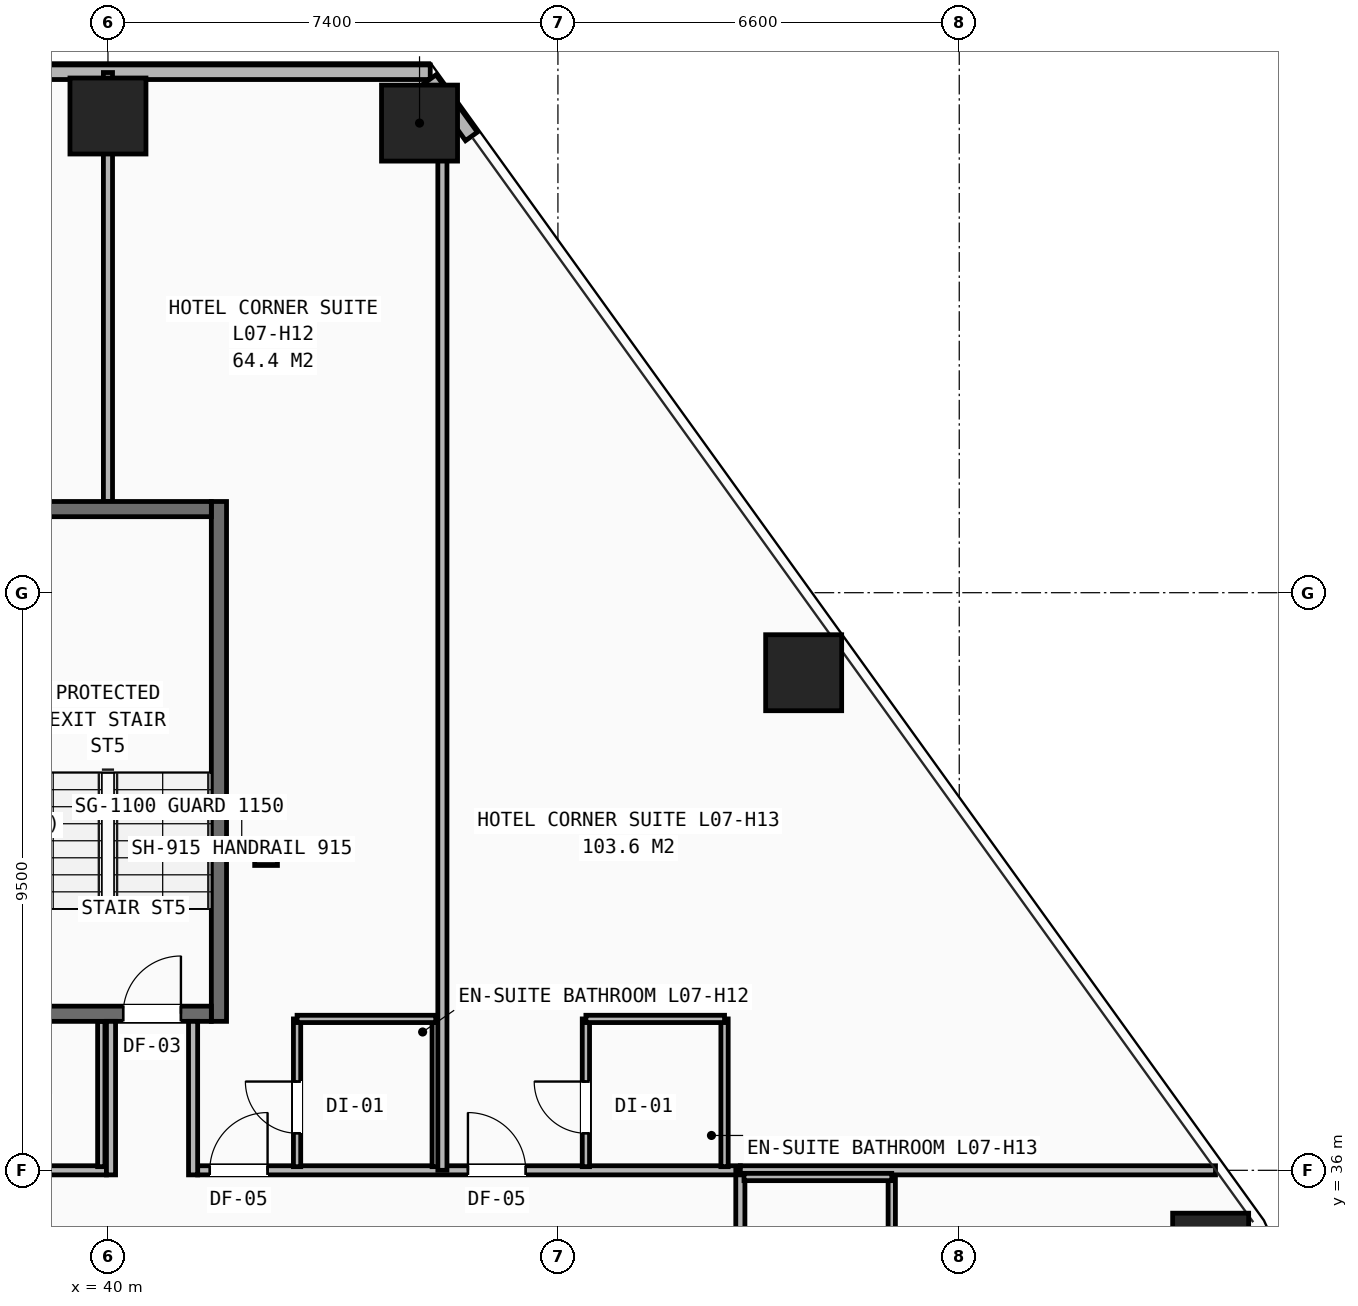
"""IFC4 building model, lengths in metres.
Left out: names, types, materials, properties, quantities, classifications, styles, units other than length and angle.
Written with IfcOpenShell. Run it as: python <this file> out.ifc"""

import sys

from ifc_helpers import new_model, si_unit, direction, frame, frame_2d, origin, origin_2d, place, context, subcontext, project, spatial, rectangle, hollow_rectangle, i_section, extrude, element, fill, save


model = new_model("IFC4")
c1 = context("Model", 3, precision=1e-05, world=origin(), true_north=direction((0.0, 1.0)))
c2 = subcontext(c1, "Body", "Model", "MODEL_VIEW")
j1 = project(units=[si_unit("LENGTHUNIT", "METRE"), si_unit("PLANEANGLEUNIT", "RADIAN")], contexts=[c1])
p1 = place(None, origin())
s1 = spatial("IfcSite", under=j1, at=p1, CompositionType="ELEMENT")
p2 = place(p1, origin())
s2 = spatial("IfcBuilding", under=s1, at=p2, CompositionType="ELEMENT")
p3 = place(p2, frame((0.0, 0.0, 30.4)))
s3 = spatial("IfcBuildingStorey", under=s2, at=p3, CompositionType="ELEMENT", Elevation=30.4)
p4 = place(p3, frame((42.6, 41.2, 0.0), z_axis=(0.0, 0.0, 1.0), x_axis=(1.0, 0.0, 0.0)))
e1 = element("IfcColumn", 1, at=p4, inside=s3, PredefinedType="COLUMN", context=c2, shape_type="SweptSolid", body=[
    extrude(i_section(OverallWidth=0.374, OverallDepth=0.372, WebThickness=0.016, FlangeThickness=0.026, at=origin_2d()), origin(), (0.0, 0.0, 1.0), 3.2),
])
for number, where, z_axis, x_axis in (
    (2, (45.124, 53.223, 0.0), (0.0, 0.0, 1.0), (1.0, 0.0, 0.0)),
    (3, (40.0, 53.34, 0.0), (0.0, 0.0, 1.0), (1.0, 0.0, 0.0)),
    (4, (58.135, 34.67, 0.0), (0.0, 0.0, 1.0), (1.0, 0.0, 0.0)),
    (5, (51.441, 44.184, 0.0), (0.0, 0.0, 1.0), (1.0, 0.0, 0.0)),
):
    element("IfcColumn", number, at=place(p3, frame(where, z_axis=z_axis, x_axis=x_axis)), inside=s3, PredefinedType="COLUMN", context=c2, shape_type="SweptSolid", body=[
        extrude(hollow_rectangle(XDim=1.25, YDim=1.25, WallThickness=0.08, at=origin_2d()), origin(), (0.0, 0.0, 1.0), 3.2),
    ])
p5 = place(p3, frame((34.7, 54.06, 0.0), z_axis=(0.0, 0.0, 1.0), x_axis=(1.0, 0.0, 0.0)))
e6 = element("IfcWall", 6, at=p5, inside=s3, PredefinedType="SHEAR", context=c2, shape_type="SweptSolid", body=[
    extrude(rectangle(XDim=10.6, YDim=0.24, at=frame_2d((5.3, 0.0))), origin(), (0.0, 0.0, 1.0), 2.263),
])
p6 = place(p3, frame((45.978, 53.005, 0.0), z_axis=(0.0, 0.0, 1.0), x_axis=(-0.584293660118, 0.811542308661, 0.0)))
e7 = element("IfcWall", 7, at=p6, inside=s3, PredefinedType="SHEAR", context=c2, shape_type="SweptSolid", body=[
    extrude(rectangle(XDim=1.162, YDim=0.24, at=frame_2d((0.581, 0.0))), origin(), (0.0, 0.0, 1.0), 2.263),
])
p7 = place(p3, frame((29.6, 36.0, 0.0), z_axis=(0.0, 0.0, 1.0), x_axis=(1.0, 0.0, 0.0)))
e8 = element("IfcWall", 8, at=p7, inside=s3, PredefinedType="PARTITIONING", context=c2, shape_type="SweptSolid", body=[
    extrude(rectangle(XDim=10.375, YDim=0.15, at=frame_2d((5.188, 0.0))), origin(), (0.0, 0.0, 1.0), 2.98),
])
p8 = place(p7, frame((0.57, 0.0, 0.0)))
e9 = element("IfcOpeningElement", 9, at=p8, cuts=e8, PredefinedType="OPENING", context=c2, shape_type="SweptSolid", body=[
    extrude(rectangle(XDim=0.95, YDim=2.1, at=frame_2d((0.475, 1.05))), frame((0.0, 0.085, 0.0), z_axis=(0.0, -1.0, 0.0), x_axis=(1.0, 0.0, 0.0)), (0.0, 0.0, 1.0), 0.17),
])
p9 = place(p7, frame((5.32, 0.0, 0.0)))
e10 = element("IfcOpeningElement", 10, at=p9, cuts=e8, PredefinedType="OPENING", context=c2, shape_type="SweptSolid", body=[
    extrude(rectangle(XDim=0.95, YDim=2.1, at=frame_2d((0.475, 1.05))), frame((0.0, 0.085, 0.0), z_axis=(0.0, -1.0, 0.0), x_axis=(1.0, 0.0, 0.0)), (0.0, 0.0, 1.0), 0.17),
])
p10 = place(p3, frame((41.475, 36.0, 0.0), z_axis=(0.0, 0.0, 1.0), x_axis=(1.0, 0.0, 0.0)))
e11 = element("IfcWall", 11, at=p10, inside=s3, PredefinedType="PARTITIONING", context=c2, shape_type="SweptSolid", body=[
    extrude(rectangle(XDim=8.925, YDim=0.15, at=frame_2d((4.462, 0.0))), origin(), (0.0, 0.0, 1.0), 2.513),
])
p11 = place(p10, frame((0.2, 0.0, 0.0)))
e12 = element("IfcOpeningElement", 12, at=p11, cuts=e11, PredefinedType="OPENING", context=c2, shape_type="SweptSolid", body=[
    extrude(rectangle(XDim=0.95, YDim=2.1, at=frame_2d((0.475, 1.05))), frame((0.0, 0.085, 0.0), z_axis=(0.0, -1.0, 0.0), x_axis=(1.0, 0.0, 0.0)), (0.0, 0.0, 1.0), 0.17),
])
p12 = place(p10, frame((4.445, 0.0, 0.0)))
e13 = element("IfcOpeningElement", 13, at=p12, cuts=e11, PredefinedType="OPENING", context=c2, shape_type="SweptSolid", body=[
    extrude(rectangle(XDim=0.95, YDim=2.1, at=frame_2d((0.475, 1.05))), frame((0.0, 0.085, 0.0), z_axis=(0.0, -1.0, 0.0), x_axis=(1.0, 0.0, 0.0)), (0.0, 0.0, 1.0), 0.17),
])
p13 = place(p3, frame((50.4, 14.1, 0.0), z_axis=(0.0, 0.0, 1.0), x_axis=(0.0, 1.0, 0.0)))
e14 = element("IfcWall", 14, at=p13, inside=s3, PredefinedType="PARTITIONING", context=c2, shape_type="SweptSolid", body=[
    extrude(rectangle(XDim=21.9, YDim=0.15, at=frame_2d((10.95, 0.0))), origin(), (0.0, 0.0, 1.0), 2.431),
])
p14 = place(p13, frame((0.42, 0.0, 0.0)))
e15 = element("IfcOpeningElement", 15, at=p14, cuts=e14, PredefinedType="OPENING", context=c2, shape_type="SweptSolid", body=[
    extrude(rectangle(XDim=0.95, YDim=2.1, at=frame_2d((0.475, 1.05))), frame((0.0, 0.085, 0.0), z_axis=(0.0, -1.0, 0.0), x_axis=(1.0, 0.0, 0.0)), (0.0, 0.0, 1.0), 0.17),
])
p15 = place(p13, frame((7.82, 0.0, 0.0)))
e16 = element("IfcOpeningElement", 16, at=p15, cuts=e14, PredefinedType="OPENING", context=c2, shape_type="SweptSolid", body=[
    extrude(rectangle(XDim=0.95, YDim=2.1, at=frame_2d((0.475, 1.05))), frame((0.0, 0.085, 0.0), z_axis=(0.0, -1.0, 0.0), x_axis=(1.0, 0.0, 0.0)), (0.0, 0.0, 1.0), 0.17),
])
p16 = place(p13, frame((15.32, 0.0, 0.0)))
e17 = element("IfcOpeningElement", 17, at=p16, cuts=e14, PredefinedType="OPENING", context=c2, shape_type="SweptSolid", body=[
    extrude(rectangle(XDim=0.95, YDim=2.1, at=frame_2d((0.475, 1.05))), frame((0.0, 0.085, 0.0), z_axis=(0.0, -1.0, 0.0), x_axis=(1.0, 0.0, 0.0)), (0.0, 0.0, 1.0), 0.17),
])
p17 = place(p3, frame((50.4, 36.0, 0.0), z_axis=(0.0, 0.0, 1.0), x_axis=(1.0, 0.0, 0.0)))
e18 = element("IfcWall", 18, at=p17, inside=s3, PredefinedType="PARTITIONING", context=c2, shape_type="SweptSolid", body=[
    extrude(rectangle(XDim=7.814, YDim=0.15, at=frame_2d((3.907, 0.0))), origin(), (0.0, 0.0, 1.0), 2.268),
])
p18 = place(p3, frame((52.89, 33.61, 0.0), z_axis=(0.0, 0.0, 1.0), x_axis=(0.0, 1.0, 0.0)))
e19 = element("IfcWall", 19, at=p18, inside=s3, PredefinedType="PARTITIONING", context=c2, shape_type="SweptSolid", body=[
    extrude(rectangle(XDim=2.28, YDim=0.12, at=frame_2d((1.14, 0.0))), origin(), (0.0, 0.0, 1.0), 2.98),
])
p19 = place(p3, frame((50.46, 35.89, 0.0), z_axis=(0.0, 0.0, 1.0), x_axis=(1.0, 0.0, 0.0)))
e20 = element("IfcWall", 20, at=p19, inside=s3, PredefinedType="PARTITIONING", context=c2, shape_type="SweptSolid", body=[
    extrude(rectangle(XDim=2.43, YDim=0.12, at=frame_2d((1.215, 0.0))), origin(), (0.0, 0.0, 1.0), 2.513),
])
p20 = place(p3, frame((39.89, 36.06, 0.0), z_axis=(0.0, 0.0, 1.0), x_axis=(0.0, 1.0, 0.0)))
e21 = element("IfcWall", 21, at=p20, inside=s3, PredefinedType="PARTITIONING", context=c2, shape_type="SweptSolid", body=[
    extrude(rectangle(XDim=2.39, YDim=0.12, at=frame_2d((1.195, 0.0))), origin(), (0.0, 0.0, 1.0), 2.98),
])
p21 = place(p3, frame((40.0, 47.0, 0.0), z_axis=(0.0, 0.0, 1.0), x_axis=(0.0, 1.0, 0.0)))
e22 = element("IfcWall", 22, at=p21, inside=s3, PredefinedType="PARTITIONING", context=c2, shape_type="SweptSolid", body=[
    extrude(rectangle(XDim=7.055, YDim=0.15, at=frame_2d((3.528, 0.0))), origin(), (0.0, 0.0, 1.0), 2.268),
])
p22 = place(p3, frame((43.11, 36.06, 0.0), z_axis=(0.0, 0.0, 1.0), x_axis=(0.0, 1.0, 0.0)))
e23 = element("IfcWall", 23, at=p22, inside=s3, PredefinedType="PARTITIONING", context=c2, shape_type="SweptSolid", body=[
    extrude(rectangle(XDim=2.43, YDim=0.12, at=frame_2d((1.215, 0.0))), origin(), (0.0, 0.0, 1.0), 2.98),
])
p23 = place(p22, frame((0.55, 0.0, 0.0)))
e24 = element("IfcOpeningElement", 24, at=p23, cuts=e23, PredefinedType="OPENING", context=c2, shape_type="SweptSolid", body=[
    extrude(rectangle(XDim=0.85, YDim=2.05, at=frame_2d((0.425, 1.025))), frame((0.0, 0.07, 0.0), z_axis=(0.0, -1.0, 0.0), x_axis=(1.0, 0.0, 0.0)), (0.0, 0.0, 1.0), 0.14),
])
p24 = place(p3, frame((45.39, 36.06, 0.0), z_axis=(0.0, 0.0, 1.0), x_axis=(0.0, 1.0, 0.0)))
e25 = element("IfcWall", 25, at=p24, inside=s3, PredefinedType="PARTITIONING", context=c2, shape_type="SweptSolid", body=[
    extrude(rectangle(XDim=2.43, YDim=0.12, at=frame_2d((1.215, 0.0))), origin(), (0.0, 0.0, 1.0), 2.98),
])
p25 = place(p3, frame((43.11, 38.49, 0.0), z_axis=(0.0, 0.0, 1.0), x_axis=(1.0, 0.0, 0.0)))
e26 = element("IfcWall", 26, at=p25, inside=s3, PredefinedType="PARTITIONING", context=c2, shape_type="SweptSolid", body=[
    extrude(rectangle(XDim=2.28, YDim=0.12, at=frame_2d((1.14, 0.0))), origin(), (0.0, 0.0, 1.0), 2.98),
])
p26 = place(p3, frame((45.5, 36.0, 0.0), z_axis=(0.0, 0.0, 1.0), x_axis=(0.0, 1.0, 0.0)))
e27 = element("IfcWall", 27, at=p26, inside=s3, PredefinedType="PARTITIONING", context=c2, shape_type="SweptSolid", body=[
    extrude(rectangle(XDim=17.66, YDim=0.15, at=frame_2d((8.83, 0.0))), origin(), (0.0, 0.0, 1.0), 2.268),
])
p27 = place(p3, frame((47.86, 36.06, 0.0), z_axis=(0.0, 0.0, 1.0), x_axis=(0.0, 1.0, 0.0)))
e28 = element("IfcWall", 28, at=p27, inside=s3, PredefinedType="PARTITIONING", context=c2, shape_type="SweptSolid", body=[
    extrude(rectangle(XDim=2.43, YDim=0.12, at=frame_2d((1.215, 0.0))), origin(), (0.0, 0.0, 1.0), 2.98),
])
p28 = place(p27, frame((0.55, 0.0, 0.0)))
e29 = element("IfcOpeningElement", 29, at=p28, cuts=e28, PredefinedType="OPENING", context=c2, shape_type="SweptSolid", body=[
    extrude(rectangle(XDim=0.85, YDim=2.05, at=frame_2d((0.425, 1.025))), frame((0.0, 0.07, 0.0), z_axis=(0.0, -1.0, 0.0), x_axis=(1.0, 0.0, 0.0)), (0.0, 0.0, 1.0), 0.14),
])
p29 = place(p3, frame((50.14, 36.06, 0.0), z_axis=(0.0, 0.0, 1.0), x_axis=(0.0, 1.0, 0.0)))
e30 = element("IfcWall", 30, at=p29, inside=s3, PredefinedType="PARTITIONING", context=c2, shape_type="SweptSolid", body=[
    extrude(rectangle(XDim=2.43, YDim=0.12, at=frame_2d((1.215, 0.0))), origin(), (0.0, 0.0, 1.0), 2.513),
])
p30 = place(p3, frame((47.86, 38.49, 0.0), z_axis=(0.0, 0.0, 1.0), x_axis=(1.0, 0.0, 0.0)))
e31 = element("IfcWall", 31, at=p30, inside=s3, PredefinedType="PARTITIONING", context=c2, shape_type="SweptSolid", body=[
    extrude(rectangle(XDim=2.28, YDim=0.12, at=frame_2d((1.14, 0.0))), origin(), (0.0, 0.0, 1.0), 2.513),
])
p31 = place(p3, frame((41.825, 38.45, 0.0), z_axis=(0.0, 0.0, 1.0), x_axis=(0.0, 1.0, 0.0)))
e32 = element("IfcWall", 32, at=p31, inside=s3, PredefinedType="SHEAR", context=c2, shape_type="SweptSolid", body=[
    extrude(rectangle(XDim=8.55, YDim=0.25, at=frame_2d((4.275, 0.0))), origin(), (0.0, 0.0, 1.0), 2.98),
])
p32 = place(p3, frame((38.3, 38.575, 0.0), z_axis=(0.0, 0.0, 1.0), x_axis=(1.0, 0.0, 0.0)))
e33 = element("IfcWall", 33, at=p32, inside=s3, PredefinedType="SHEAR", context=c2, shape_type="SweptSolid", body=[
    extrude(rectangle(XDim=3.4, YDim=0.25, at=frame_2d((1.7, 0.0))), origin(), (0.0, 0.0, 1.0), 2.98),
])
p33 = place(p32, frame((1.95, 0.0, 0.0)))
e34 = element("IfcOpeningElement", 34, at=p33, cuts=e33, PredefinedType="OPENING", context=c2, shape_type="SweptSolid", body=[
    extrude(rectangle(XDim=0.95, YDim=2.1, at=frame_2d((0.475, 1.05))), frame((0.0, 0.135, 0.0), z_axis=(0.0, -1.0, 0.0), x_axis=(1.0, 0.0, 0.0)), (0.0, 0.0, 1.0), 0.27),
])
p34 = place(p3, frame((38.3, 46.875, 0.0), z_axis=(0.0, 0.0, 1.0), x_axis=(1.0, 0.0, 0.0)))
e35 = element("IfcWall", 35, at=p34, inside=s3, PredefinedType="SHEAR", context=c2, shape_type="SweptSolid", body=[
    extrude(rectangle(XDim=3.4, YDim=0.25, at=frame_2d((1.7, 0.0))), origin(), (0.0, 0.0, 1.0), 2.98),
])
for number, where, z_axis, x_axis in (
    (36, (40.05, 35.925, 0.0), (0.0, 0.0, 1.0), (0.0, 1.0, 0.0)),
    (37, (41.4, 35.925, 0.0), (0.0, 0.0, 1.0), (0.0, 1.0, 0.0)),
):
    element("IfcWall", number, at=place(p3, frame(where, z_axis=z_axis, x_axis=x_axis)), inside=s3, PredefinedType="PARTITIONING", context=c2, shape_type="SweptSolid", body=[
        extrude(rectangle(XDim=2.525, YDim=0.15, at=frame_2d((1.262, 0.0))), origin(), (0.0, 0.0, 1.0), 2.98),
    ])
p35 = place(p11, origin())
e38 = element("IfcDoor", 38, at=p35, inside=s3, OperationType="SINGLE_SWING_RIGHT", PredefinedType="DOOR", context=c2, shape_type="SweptSolid", body=[
    extrude(rectangle(XDim=0.95, YDim=2.1, at=frame_2d((0.475, 1.05))), frame((0.0, 0.025, 0.0), z_axis=(0.0, -1.0, 0.0), x_axis=(1.0, 0.0, 0.0)), (0.0, 0.0, 1.0), 0.05),
])
fill(e12, e38)
p36 = place(p23, origin())
e39 = element("IfcDoor", 39, at=p36, inside=s3, OperationType="SINGLE_SWING_RIGHT", PredefinedType="DOOR", context=c2, shape_type="SweptSolid", body=[
    extrude(rectangle(XDim=0.85, YDim=2.05, at=frame_2d((0.425, 1.025))), frame((0.0, 0.025, 0.0), z_axis=(0.0, -1.0, 0.0), x_axis=(1.0, 0.0, 0.0)), (0.0, 0.0, 1.0), 0.05),
])
fill(e24, e39)
p37 = place(p12, origin())
e40 = element("IfcDoor", 40, at=p37, inside=s3, OperationType="SINGLE_SWING_LEFT", PredefinedType="DOOR", context=c2, shape_type="SweptSolid", body=[
    extrude(rectangle(XDim=0.95, YDim=2.1, at=frame_2d((0.475, 1.05))), frame((0.0, 0.025, 0.0), z_axis=(0.0, -1.0, 0.0), x_axis=(1.0, 0.0, 0.0)), (0.0, 0.0, 1.0), 0.05),
])
fill(e13, e40)
p38 = place(p28, origin())
e41 = element("IfcDoor", 41, at=p38, inside=s3, OperationType="SINGLE_SWING_RIGHT", PredefinedType="DOOR", context=c2, shape_type="SweptSolid", body=[
    extrude(rectangle(XDim=0.85, YDim=2.05, at=frame_2d((0.425, 1.025))), frame((0.0, 0.025, 0.0), z_axis=(0.0, -1.0, 0.0), x_axis=(1.0, 0.0, 0.0)), (0.0, 0.0, 1.0), 0.05),
])
fill(e29, e41)
p39 = place(p33, origin())
e42 = element("IfcDoor", 42, at=p39, inside=s3, OperationType="SINGLE_SWING_RIGHT", PredefinedType="DOOR", context=c2, shape_type="SweptSolid", body=[
    extrude(rectangle(XDim=0.95, YDim=2.1, at=frame_2d((0.475, 1.05))), frame((0.0, 0.025, 0.0), z_axis=(0.0, -1.0, 0.0), x_axis=(1.0, 0.0, 0.0)), (0.0, 0.0, 1.0), 0.05),
])
fill(e34, e42)
save(model, sys.argv[1])
